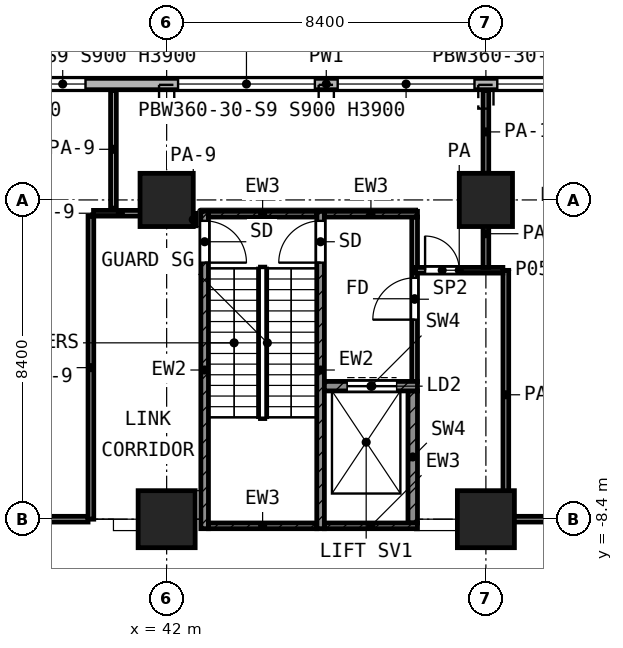
"""IFC4 building model, lengths in metres.
Left out: names, types, materials, properties, quantities, classifications, styles, units other than length and angle.
Written with IfcOpenShell. Run it as: python <this file> out.ifc"""

import sys

from ifc_helpers import new_model, si_unit, direction, frame, frame_2d, origin, origin_2d, place, context, subcontext, project, spatial, rectangle, extrude, element, fill, save


model = new_model("IFC4")
c1 = context("Model", 3, precision=1e-05, world=origin(), true_north=direction((0.0, 1.0)))
c2 = subcontext(c1, "Body", "Model", "MODEL_VIEW")
j1 = project(units=[si_unit("LENGTHUNIT", "METRE"), si_unit("PLANEANGLEUNIT", "RADIAN")], contexts=[c1])
p1 = place(None, origin())
s1 = spatial("IfcSite", under=j1, at=p1, CompositionType="ELEMENT")
p2 = place(p1, origin())
s2 = spatial("IfcBuilding", under=s1, at=p2, CompositionType="ELEMENT")
p3 = place(p2, frame((0.0, 0.0, 23.8)))
s3 = spatial("IfcBuildingStorey", under=s2, at=p3, CompositionType="ELEMENT", Elevation=23.8)
for number, where, z_axis, x_axis in (
    (1, (42.0, 0.0, 0.0), (0.0, 0.0, 1.0), (1.0, 0.0, 0.0)),
    (2, (50.4, 0.0, 0.0), (0.0, 0.0, 1.0), (1.0, 0.0, 0.0)),
):
    element("IfcColumn", number, at=place(p3, frame(where, z_axis=z_axis, x_axis=x_axis)), inside=s3, PredefinedType="COLUMN", context=c2, shape_type="SweptSolid", body=[
        extrude(rectangle(XDim=1.4, YDim=1.4, at=origin_2d()), origin(), (0.0, 0.0, 1.0), 5.2),
    ])
for number, where, z_axis, x_axis in (
    (3, (42.0, -8.4, 0.0), (0.0, 0.0, 1.0), (1.0, 0.0, 0.0)),
    (4, (50.4, -8.4, 0.0), (0.0, 0.0, 1.0), (1.0, 0.0, 0.0)),
):
    element("IfcColumn", number, at=place(p3, frame(where, z_axis=z_axis, x_axis=x_axis)), inside=s3, PredefinedType="COLUMN", context=c2, shape_type="SweptSolid", body=[
        extrude(rectangle(XDim=1.5, YDim=1.5, at=origin_2d()), origin(), (0.0, 0.0, 1.0), 5.2),
    ])
p4 = place(p3, frame((89.538, 3.05, 0.0), z_axis=(0.0, 0.0, 1.0), x_axis=(-1.0, 0.0, 0.0)))
e5 = element("IfcWall", 5, at=p4, inside=s3, PredefinedType="SOLIDWALL", context=c2, shape_type="SweptSolid", body=[
    extrude(rectangle(XDim=86.676, YDim=0.3, at=frame_2d((43.338, 0.0))), origin(), (0.0, 0.0, 1.0), 4.85),
])
p5 = place(p4, frame((1.638, 0.0, 0.9)))
e6 = element("IfcOpeningElement", 6, at=p5, cuts=e5, PredefinedType="OPENING", context=c2, shape_type="SweptSolid", body=[
    extrude(rectangle(XDim=3.6, YDim=3.0, at=frame_2d((1.8, 1.5))), frame((0.0, 0.16, 0.0), z_axis=(0.0, -1.0, 0.0), x_axis=(1.0, 0.0, 0.0)), (0.0, 0.0, 1.0), 0.32),
])
p6 = place(p4, frame((5.838, 0.0, 0.9)))
e7 = element("IfcOpeningElement", 7, at=p6, cuts=e5, PredefinedType="OPENING", context=c2, shape_type="SweptSolid", body=[
    extrude(rectangle(XDim=3.6, YDim=3.0, at=frame_2d((1.8, 1.5))), frame((0.0, 0.16, 0.0), z_axis=(0.0, -1.0, 0.0), x_axis=(1.0, 0.0, 0.0)), (0.0, 0.0, 1.0), 0.32),
])
p7 = place(p4, frame((10.723, 0.0, 0.9)))
e8 = element("IfcOpeningElement", 8, at=p7, cuts=e5, PredefinedType="OPENING", context=c2, shape_type="SweptSolid", body=[
    extrude(rectangle(XDim=2.4, YDim=3.0, at=frame_2d((1.2, 1.5))), frame((0.0, 0.16, 0.0), z_axis=(0.0, -1.0, 0.0), x_axis=(1.0, 0.0, 0.0)), (0.0, 0.0, 1.0), 0.32),
])
p8 = place(p4, frame((14.623, 0.0, 0.9)))
e9 = element("IfcOpeningElement", 9, at=p8, cuts=e5, PredefinedType="OPENING", context=c2, shape_type="SweptSolid", body=[
    extrude(rectangle(XDim=2.4, YDim=3.0, at=frame_2d((1.2, 1.5))), frame((0.0, 0.16, 0.0), z_axis=(0.0, -1.0, 0.0), x_axis=(1.0, 0.0, 0.0)), (0.0, 0.0, 1.0), 0.32),
])
p9 = place(p4, frame((18.438, 0.0, 0.9)))
e10 = element("IfcOpeningElement", 10, at=p9, cuts=e5, PredefinedType="OPENING", context=c2, shape_type="SweptSolid", body=[
    extrude(rectangle(XDim=3.6, YDim=3.0, at=frame_2d((1.8, 1.5))), frame((0.0, 0.16, 0.0), z_axis=(0.0, -1.0, 0.0), x_axis=(1.0, 0.0, 0.0)), (0.0, 0.0, 1.0), 0.32),
])
p10 = place(p4, frame((22.638, 0.0, 0.9)))
e11 = element("IfcOpeningElement", 11, at=p10, cuts=e5, PredefinedType="OPENING", context=c2, shape_type="SweptSolid", body=[
    extrude(rectangle(XDim=3.6, YDim=3.0, at=frame_2d((1.8, 1.5))), frame((0.0, 0.16, 0.0), z_axis=(0.0, -1.0, 0.0), x_axis=(1.0, 0.0, 0.0)), (0.0, 0.0, 1.0), 0.32),
])
p11 = place(p4, frame((26.838, 0.0, 0.9)))
e12 = element("IfcOpeningElement", 12, at=p11, cuts=e5, PredefinedType="OPENING", context=c2, shape_type="SweptSolid", body=[
    extrude(rectangle(XDim=3.6, YDim=3.0, at=frame_2d((1.8, 1.5))), frame((0.0, 0.16, 0.0), z_axis=(0.0, -1.0, 0.0), x_axis=(1.0, 0.0, 0.0)), (0.0, 0.0, 1.0), 0.32),
])
p12 = place(p4, frame((31.038, 0.0, 0.9)))
e13 = element("IfcOpeningElement", 13, at=p12, cuts=e5, PredefinedType="OPENING", context=c2, shape_type="SweptSolid", body=[
    extrude(rectangle(XDim=3.6, YDim=3.0, at=frame_2d((1.8, 1.5))), frame((0.0, 0.16, 0.0), z_axis=(0.0, -1.0, 0.0), x_axis=(1.0, 0.0, 0.0)), (0.0, 0.0, 1.0), 0.32),
])
p13 = place(p4, frame((35.238, 0.0, 0.9)))
e14 = element("IfcOpeningElement", 14, at=p13, cuts=e5, PredefinedType="OPENING", context=c2, shape_type="SweptSolid", body=[
    extrude(rectangle(XDim=3.6, YDim=3.0, at=frame_2d((1.8, 1.5))), frame((0.0, 0.16, 0.0), z_axis=(0.0, -1.0, 0.0), x_axis=(1.0, 0.0, 0.0)), (0.0, 0.0, 1.0), 0.32),
])
p14 = place(p4, frame((39.438, 0.0, 0.9)))
e15 = element("IfcOpeningElement", 15, at=p14, cuts=e5, PredefinedType="OPENING", context=c2, shape_type="SweptSolid", body=[
    extrude(rectangle(XDim=3.6, YDim=3.0, at=frame_2d((1.8, 1.5))), frame((0.0, 0.16, 0.0), z_axis=(0.0, -1.0, 0.0), x_axis=(1.0, 0.0, 0.0)), (0.0, 0.0, 1.0), 0.32),
])
p15 = place(p4, frame((43.638, 0.0, 0.9)))
e16 = element("IfcOpeningElement", 16, at=p15, cuts=e5, PredefinedType="OPENING", context=c2, shape_type="SweptSolid", body=[
    extrude(rectangle(XDim=3.6, YDim=3.0, at=frame_2d((1.8, 1.5))), frame((0.0, 0.16, 0.0), z_axis=(0.0, -1.0, 0.0), x_axis=(1.0, 0.0, 0.0)), (0.0, 0.0, 1.0), 0.32),
])
p16 = place(p4, frame((49.673, 0.0, 0.9)))
e17 = element("IfcOpeningElement", 17, at=p16, cuts=e5, PredefinedType="OPENING", context=c2, shape_type="SweptSolid", body=[
    extrude(rectangle(XDim=1.2, YDim=3.0, at=frame_2d((0.6, 1.5))), frame((0.0, 0.16, 0.0), z_axis=(0.0, -1.0, 0.0), x_axis=(1.0, 0.0, 0.0)), (0.0, 0.0, 1.0), 0.32),
])
p17 = place(p4, frame((52.038, 0.0, 0.9)))
e18 = element("IfcOpeningElement", 18, at=p17, cuts=e5, PredefinedType="OPENING", context=c2, shape_type="SweptSolid", body=[
    extrude(rectangle(XDim=3.6, YDim=3.0, at=frame_2d((1.8, 1.5))), frame((0.0, 0.16, 0.0), z_axis=(0.0, -1.0, 0.0), x_axis=(1.0, 0.0, 0.0)), (0.0, 0.0, 1.0), 0.32),
])
p18 = place(p4, frame((56.623, 0.0, 0.9)))
e19 = element("IfcOpeningElement", 19, at=p18, cuts=e5, PredefinedType="OPENING", context=c2, shape_type="SweptSolid", body=[
    extrude(rectangle(XDim=2.4, YDim=3.0, at=frame_2d((1.2, 1.5))), frame((0.0, 0.16, 0.0), z_axis=(0.0, -1.0, 0.0), x_axis=(1.0, 0.0, 0.0)), (0.0, 0.0, 1.0), 0.32),
])
p19 = place(p4, frame((60.438, 0.0, 0.9)))
e20 = element("IfcOpeningElement", 20, at=p19, cuts=e5, PredefinedType="OPENING", context=c2, shape_type="SweptSolid", body=[
    extrude(rectangle(XDim=3.6, YDim=3.0, at=frame_2d((1.8, 1.5))), frame((0.0, 0.16, 0.0), z_axis=(0.0, -1.0, 0.0), x_axis=(1.0, 0.0, 0.0)), (0.0, 0.0, 1.0), 0.32),
])
p20 = place(p4, frame((64.638, 0.0, 0.9)))
e21 = element("IfcOpeningElement", 21, at=p20, cuts=e5, PredefinedType="OPENING", context=c2, shape_type="SweptSolid", body=[
    extrude(rectangle(XDim=3.6, YDim=3.0, at=frame_2d((1.8, 1.5))), frame((0.0, 0.16, 0.0), z_axis=(0.0, -1.0, 0.0), x_axis=(1.0, 0.0, 0.0)), (0.0, 0.0, 1.0), 0.32),
])
p21 = place(p4, frame((68.838, 0.0, 0.9)))
e22 = element("IfcOpeningElement", 22, at=p21, cuts=e5, PredefinedType="OPENING", context=c2, shape_type="SweptSolid", body=[
    extrude(rectangle(XDim=3.6, YDim=3.0, at=frame_2d((1.8, 1.5))), frame((0.0, 0.16, 0.0), z_axis=(0.0, -1.0, 0.0), x_axis=(1.0, 0.0, 0.0)), (0.0, 0.0, 1.0), 0.32),
])
p22 = place(p4, frame((73.038, 0.0, 0.9)))
e23 = element("IfcOpeningElement", 23, at=p22, cuts=e5, PredefinedType="OPENING", context=c2, shape_type="SweptSolid", body=[
    extrude(rectangle(XDim=3.6, YDim=3.0, at=frame_2d((1.8, 1.5))), frame((0.0, 0.16, 0.0), z_axis=(0.0, -1.0, 0.0), x_axis=(1.0, 0.0, 0.0)), (0.0, 0.0, 1.0), 0.32),
])
p23 = place(p4, frame((77.238, 0.0, 0.9)))
e24 = element("IfcOpeningElement", 24, at=p23, cuts=e5, PredefinedType="OPENING", context=c2, shape_type="SweptSolid", body=[
    extrude(rectangle(XDim=3.6, YDim=3.0, at=frame_2d((1.8, 1.5))), frame((0.0, 0.16, 0.0), z_axis=(0.0, -1.0, 0.0), x_axis=(1.0, 0.0, 0.0)), (0.0, 0.0, 1.0), 0.32),
])
p24 = place(p4, frame((81.438, 0.0, 0.9)))
e25 = element("IfcOpeningElement", 25, at=p24, cuts=e5, PredefinedType="OPENING", context=c2, shape_type="SweptSolid", body=[
    extrude(rectangle(XDim=3.6, YDim=3.0, at=frame_2d((1.8, 1.5))), frame((0.0, 0.16, 0.0), z_axis=(0.0, -1.0, 0.0), x_axis=(1.0, 0.0, 0.0)), (0.0, 0.0, 1.0), 0.32),
])
p25 = place(p3, frame((43.0, -8.65, 0.0), z_axis=(0.0, 0.0, 1.0), x_axis=(0.0, 1.0, 0.0)))
e26 = element("IfcWall", 26, at=p25, inside=s3, PredefinedType="SHEAR", context=c2, shape_type="SweptSolid", body=[
    extrude(rectangle(XDim=8.35, YDim=0.2, at=frame_2d((4.175, 0.0))), origin(), (0.0, 0.0, 1.0), 4.85),
])
p26 = place(p25, frame((7.0, 0.0, 0.0)))
e27 = element("IfcOpeningElement", 27, at=p26, cuts=e26, PredefinedType="OPENING", context=c2, shape_type="SweptSolid", body=[
    extrude(rectangle(XDim=1.1, YDim=2.1, at=frame_2d((0.55, 1.05))), frame((0.0, 0.11, 0.0), z_axis=(0.0, -1.0, 0.0), x_axis=(1.0, 0.0, 0.0)), (0.0, 0.0, 1.0), 0.22),
])
p27 = place(p3, frame((46.05, -8.65, 0.0), z_axis=(0.0, 0.0, 1.0), x_axis=(0.0, 1.0, 0.0)))
e28 = element("IfcWall", 28, at=p27, inside=s3, PredefinedType="SHEAR", context=c2, shape_type="SweptSolid", body=[
    extrude(rectangle(XDim=8.35, YDim=0.2, at=frame_2d((4.175, 0.0))), origin(), (0.0, 0.0, 1.0), 4.85),
])
p28 = place(p27, frame((7.0, 0.0, 0.0)))
e29 = element("IfcOpeningElement", 29, at=p28, cuts=e28, PredefinedType="OPENING", context=c2, shape_type="SweptSolid", body=[
    extrude(rectangle(XDim=1.1, YDim=2.1, at=frame_2d((0.55, 1.05))), frame((0.0, 0.11, 0.0), z_axis=(0.0, -1.0, 0.0), x_axis=(1.0, 0.0, 0.0)), (0.0, 0.0, 1.0), 0.22),
])
p29 = place(p3, frame((43.1, -0.375, 0.0), z_axis=(0.0, 0.0, 1.0), x_axis=(1.0, 0.0, 0.0)))
e30 = element("IfcWall", 30, at=p29, inside=s3, PredefinedType="SHEAR", context=c2, shape_type="SweptSolid", body=[
    extrude(rectangle(XDim=2.85, YDim=0.15, at=frame_2d((1.425, 0.0))), origin(), (0.0, 0.0, 1.0), 4.85),
])
p30 = place(p3, frame((46.15, -0.375, 0.0), z_axis=(0.0, 0.0, 1.0), x_axis=(1.0, 0.0, 0.0)))
e31 = element("IfcWall", 31, at=p30, inside=s3, PredefinedType="SHEAR", context=c2, shape_type="SweptSolid", body=[
    extrude(rectangle(XDim=2.45, YDim=0.15, at=frame_2d((1.225, 0.0))), origin(), (0.0, 0.0, 1.0), 4.85),
])
p31 = place(p3, frame((43.1, -8.575, 0.0), z_axis=(0.0, 0.0, 1.0), x_axis=(1.0, 0.0, 0.0)))
e32 = element("IfcWall", 32, at=p31, inside=s3, PredefinedType="SHEAR", context=c2, shape_type="SweptSolid", body=[
    extrude(rectangle(XDim=2.85, YDim=0.15, at=frame_2d((1.425, 0.0))), origin(), (0.0, 0.0, 1.0), 4.85),
])
p32 = place(p3, frame((46.15, -8.575, 0.0), z_axis=(0.0, 0.0, 1.0), x_axis=(1.0, 0.0, 0.0)))
e33 = element("IfcWall", 33, at=p32, inside=s3, PredefinedType="SHEAR", context=c2, shape_type="SweptSolid", body=[
    extrude(rectangle(XDim=2.45, YDim=0.15, at=frame_2d((1.225, 0.0))), origin(), (0.0, 0.0, 1.0), 4.85),
])
p33 = place(p3, frame((46.15, -4.9, 0.0), z_axis=(0.0, 0.0, 1.0), x_axis=(1.0, 0.0, 0.0)))
e34 = element("IfcWall", 34, at=p33, inside=s3, PredefinedType="SHEAR", context=c2, shape_type="SweptSolid", body=[
    extrude(rectangle(XDim=2.45, YDim=0.25, at=frame_2d((1.225, 0.0))), origin(), (0.0, 0.0, 1.0), 4.85),
])
p34 = place(p33, frame((0.6, 0.0, 0.0)))
e35 = element("IfcOpeningElement", 35, at=p34, cuts=e34, PredefinedType="OPENING", context=c2, shape_type="SweptSolid", body=[
    extrude(rectangle(XDim=1.3, YDim=2.1, at=frame_2d((0.65, 1.05))), frame((0.0, 0.135, 0.0), z_axis=(0.0, -1.0, 0.0), x_axis=(1.0, 0.0, 0.0)), (0.0, 0.0, 1.0), 0.27),
])
p35 = place(p3, frame((48.475, -8.5, 0.0), z_axis=(0.0, 0.0, 1.0), x_axis=(0.0, 1.0, 0.0)))
e36 = element("IfcWall", 36, at=p35, inside=s3, PredefinedType="SHEAR", context=c2, shape_type="SweptSolid", body=[
    extrude(rectangle(XDim=3.475, YDim=0.25, at=frame_2d((1.738, 0.0))), origin(), (0.0, 0.0, 1.0), 4.85),
])
p36 = place(p3, frame((48.525, -4.775, 0.0), z_axis=(0.0, 0.0, 1.0), x_axis=(0.0, 1.0, 0.0)))
e37 = element("IfcWall", 37, at=p36, inside=s3, PredefinedType="PARTITIONING", context=c2, shape_type="SweptSolid", body=[
    extrude(rectangle(XDim=4.325, YDim=0.15, at=frame_2d((2.163, 0.0))), origin(), (0.0, 0.0, 1.0), 4.85),
])
p37 = place(p36, frame((1.625, 0.0, 0.0)))
e38 = element("IfcOpeningElement", 38, at=p37, cuts=e37, PredefinedType="OPENING", context=c2, shape_type="SweptSolid", body=[
    extrude(rectangle(XDim=1.1, YDim=2.1, at=frame_2d((0.55, 1.05))), frame((0.0, 0.085, 0.0), z_axis=(0.0, -1.0, 0.0), x_axis=(1.0, 0.0, 0.0)), (0.0, 0.0, 1.0), 0.17),
])
p38 = place(p3, frame((25.2, -8.4, 0.0), z_axis=(0.0, 0.0, 1.0), x_axis=(1.0, 0.0, 0.0)))
e39 = element("IfcWall", 39, at=p38, inside=s3, PredefinedType="PARTITIONING", context=c2, shape_type="SweptSolid", body=[
    extrude(rectangle(XDim=14.732, YDim=0.15, at=frame_2d((7.366, 0.0))), origin(), (0.0, 0.0, 1.0), 4.85),
])
p39 = place(p38, frame((1.8, 0.0, 0.0)))
e40 = element("IfcOpeningElement", 40, at=p39, cuts=e39, PredefinedType="OPENING", context=c2, shape_type="SweptSolid", body=[
    extrude(rectangle(XDim=1.2, YDim=2.1, at=frame_2d((0.6, 1.05))), frame((0.0, 0.085, 0.0), z_axis=(0.0, -1.0, 0.0), x_axis=(1.0, 0.0, 0.0)), (0.0, 0.0, 1.0), 0.17),
])
p40 = place(p38, frame((6.536, 0.0, 0.0)))
e41 = element("IfcOpeningElement", 41, at=p40, cuts=e39, PredefinedType="OPENING", context=c2, shape_type="SweptSolid", body=[
    extrude(rectangle(XDim=1.0, YDim=2.1, at=frame_2d((0.5, 1.05))), frame((0.0, 0.085, 0.0), z_axis=(0.0, -1.0, 0.0), x_axis=(1.0, 0.0, 0.0)), (0.0, 0.0, 1.0), 0.17),
])
p41 = place(p38, frame((10.971, 0.0, 0.0)))
e42 = element("IfcOpeningElement", 42, at=p41, cuts=e39, PredefinedType="OPENING", context=c2, shape_type="SweptSolid", body=[
    extrude(rectangle(XDim=1.0, YDim=2.1, at=frame_2d((0.5, 1.05))), frame((0.0, 0.085, 0.0), z_axis=(0.0, -1.0, 0.0), x_axis=(1.0, 0.0, 0.0)), (0.0, 0.0, 1.0), 0.17),
])
p42 = place(p3, frame((51.0, -8.4, 0.0), z_axis=(0.0, 0.0, 1.0), x_axis=(1.0, 0.0, 0.0)))
e43 = element("IfcWall", 43, at=p42, inside=s3, PredefinedType="PARTITIONING", context=c2, shape_type="SweptSolid", body=[
    extrude(rectangle(XDim=26.2, YDim=0.15, at=frame_2d((13.1, 0.0))), origin(), (0.0, 0.0, 1.0), 4.85),
])
p43 = place(p42, frame((2.05, 0.0, 0.0)))
e44 = element("IfcOpeningElement", 44, at=p43, cuts=e43, PredefinedType="OPENING", context=c2, shape_type="SweptSolid", body=[
    extrude(rectangle(XDim=1.0, YDim=2.1, at=frame_2d((0.5, 1.05))), frame((0.0, 0.085, 0.0), z_axis=(0.0, -1.0, 0.0), x_axis=(1.0, 0.0, 0.0)), (0.0, 0.0, 1.0), 0.17),
])
p44 = place(p42, frame((4.675, 0.0, 0.0)))
e45 = element("IfcOpeningElement", 45, at=p44, cuts=e43, PredefinedType="OPENING", context=c2, shape_type="SweptSolid", body=[
    extrude(rectangle(XDim=1.0, YDim=2.1, at=frame_2d((0.5, 1.05))), frame((0.0, 0.085, 0.0), z_axis=(0.0, -1.0, 0.0), x_axis=(1.0, 0.0, 0.0)), (0.0, 0.0, 1.0), 0.17),
])
p45 = place(p42, frame((11.7, 0.0, 0.0)))
e46 = element("IfcOpeningElement", 46, at=p45, cuts=e43, PredefinedType="OPENING", context=c2, shape_type="SweptSolid", body=[
    extrude(rectangle(XDim=1.0, YDim=2.1, at=frame_2d((0.5, 1.05))), frame((0.0, 0.085, 0.0), z_axis=(0.0, -1.0, 0.0), x_axis=(1.0, 0.0, 0.0)), (0.0, 0.0, 1.0), 0.17),
])
p46 = place(p42, frame((17.0, 0.0, 0.0)))
e47 = element("IfcOpeningElement", 47, at=p46, cuts=e43, PredefinedType="OPENING", context=c2, shape_type="SweptSolid", body=[
    extrude(rectangle(XDim=1.0, YDim=2.1, at=frame_2d((0.5, 1.05))), frame((0.0, 0.085, 0.0), z_axis=(0.0, -1.0, 0.0), x_axis=(1.0, 0.0, 0.0)), (0.0, 0.0, 1.0), 0.17),
])
p47 = place(p42, frame((22.233, 0.0, 0.0)))
e48 = element("IfcOpeningElement", 48, at=p47, cuts=e43, PredefinedType="OPENING", context=c2, shape_type="SweptSolid", body=[
    extrude(rectangle(XDim=1.0, YDim=2.1, at=frame_2d((0.5, 1.05))), frame((0.0, 0.085, 0.0), z_axis=(0.0, -1.0, 0.0), x_axis=(1.0, 0.0, 0.0)), (0.0, 0.0, 1.0), 0.17),
])
p48 = place(p3, frame((48.55, -1.85, 0.0), z_axis=(0.0, 0.0, 1.0), x_axis=(1.0, 0.0, 0.0)))
e49 = element("IfcWall", 49, at=p48, inside=s3, PredefinedType="PARTITIONING", context=c2, shape_type="SweptSolid", body=[
    extrude(rectangle(XDim=2.297, YDim=0.15, at=frame_2d((1.148, 0.0))), origin(), (0.0, 0.0, 1.0), 4.85),
])
p49 = place(p48, frame((0.25, 0.0, 0.0)))
e50 = element("IfcOpeningElement", 50, at=p49, cuts=e49, PredefinedType="OPENING", context=c2, shape_type="SweptSolid", body=[
    extrude(rectangle(XDim=0.9, YDim=2.1, at=frame_2d((0.45, 1.05))), frame((0.0, 0.085, 0.0), z_axis=(0.0, -1.0, 0.0), x_axis=(1.0, 0.0, 0.0)), (0.0, 0.0, 1.0), 0.17),
])
p50 = place(p3, frame((40.076, -0.35, 0.0), z_axis=(0.0, 0.0, 1.0), x_axis=(1.0, 0.0, 0.0)))
e51 = element("IfcWall", 51, at=p50, inside=s3, PredefinedType="PARTITIONING", context=c2, shape_type="SweptSolid", body=[
    extrude(rectangle(XDim=1.412, YDim=0.15, at=frame_2d((0.706, 0.0))), origin(), (0.0, 0.0, 1.0), 3.45),
])
p51 = place(p3, frame((40.007, -8.4, 0.0), z_axis=(0.0, 0.0, 1.0), x_axis=(0.0, 1.0, 0.0)))
e52 = element("IfcWall", 52, at=p51, inside=s3, PredefinedType="PARTITIONING", context=c2, shape_type="SweptSolid", body=[
    extrude(rectangle(XDim=7.975, YDim=0.15, at=frame_2d((3.987, 0.0))), origin(), (0.0, 0.0, 1.0), 3.45),
])
p52 = place(p3, frame((40.6, -0.215, 0.0), z_axis=(0.0, 0.0, 1.0), x_axis=(0.0, 1.0, 0.0)))
e53 = element("IfcWall", 53, at=p52, inside=s3, PredefinedType="PARTITIONING", context=c2, shape_type="SweptSolid", body=[
    extrude(rectangle(XDim=3.095, YDim=0.15, at=frame_2d((1.547, 0.0))), origin(), (0.0, 0.0, 1.0), 3.45),
])
p53 = place(p3, frame((42.7, -0.68, 0.0), z_axis=(0.0, 0.0, 1.0), x_axis=(0.0, 1.0, 0.0)))
e54 = element("IfcWall", 54, at=p53, inside=s3, PredefinedType="PARTITIONING", context=c2, shape_type="SweptSolid", body=[
    extrude(rectangle(XDim=0.327, YDim=0.15, at=frame_2d((0.164, 0.0))), origin(), (0.0, 0.0, 1.0), 3.45),
])
p54 = place(p3, frame((50.4, -1.775, 0.0), z_axis=(0.0, 0.0, 1.0), x_axis=(0.0, 1.0, 0.0)))
e55 = element("IfcWall", 55, at=p54, inside=s3, PredefinedType="PARTITIONING", context=c2, shape_type="SweptSolid", body=[
    extrude(rectangle(XDim=1.772, YDim=0.15, at=frame_2d((0.886, 0.0))), origin(), (0.0, 0.0, 1.0), 4.85),
])
p55 = place(p3, frame((50.4, 0.7, 0.0), z_axis=(0.0, 0.0, 1.0), x_axis=(0.0, 1.0, 0.0)))
e56 = element("IfcWall", 56, at=p55, inside=s3, PredefinedType="PARTITIONING", context=c2, shape_type="SweptSolid", body=[
    extrude(rectangle(XDim=2.18, YDim=0.15, at=frame_2d((1.09, 0.0))), origin(), (0.0, 0.0, 1.0), 3.95),
])
p56 = place(p3, frame((50.925, -8.4, 0.0), z_axis=(0.0, 0.0, 1.0), x_axis=(0.0, 1.0, 0.0)))
e57 = element("IfcWall", 57, at=p56, inside=s3, PredefinedType="PARTITIONING", context=c2, shape_type="SweptSolid", body=[
    extrude(rectangle(XDim=6.547, YDim=0.15, at=frame_2d((3.273, 0.0))), origin(), (0.0, 0.0, 1.0), 4.85),
])
p57 = place(p13, origin())
e58 = element("IfcWindow", 58, at=p57, inside=s3, PartitioningType="SINGLE_PANEL", PredefinedType="WINDOW", context=c2, shape_type="SweptSolid", body=[
    extrude(rectangle(XDim=3.6, YDim=3.0, at=frame_2d((1.8, 1.5))), frame((0.0, 0.03, 0.0), z_axis=(0.0, -1.0, 0.0), x_axis=(1.0, 0.0, 0.0)), (0.0, 0.0, 1.0), 0.06),
])
fill(e14, e58)
p58 = place(p14, origin())
e59 = element("IfcWindow", 59, at=p58, inside=s3, PartitioningType="SINGLE_PANEL", PredefinedType="WINDOW", context=c2, shape_type="SweptSolid", body=[
    extrude(rectangle(XDim=3.6, YDim=3.0, at=frame_2d((1.8, 1.5))), frame((0.0, 0.03, 0.0), z_axis=(0.0, -1.0, 0.0), x_axis=(1.0, 0.0, 0.0)), (0.0, 0.0, 1.0), 0.06),
])
fill(e15, e59)
p59 = place(p15, origin())
e60 = element("IfcWindow", 60, at=p59, inside=s3, PartitioningType="SINGLE_PANEL", PredefinedType="WINDOW", context=c2, shape_type="SweptSolid", body=[
    extrude(rectangle(XDim=3.6, YDim=3.0, at=frame_2d((1.8, 1.5))), frame((0.0, 0.03, 0.0), z_axis=(0.0, -1.0, 0.0), x_axis=(1.0, 0.0, 0.0)), (0.0, 0.0, 1.0), 0.06),
])
fill(e16, e60)
p60 = place(p16, origin())
e61 = element("IfcWindow", 61, at=p60, inside=s3, PartitioningType="SINGLE_PANEL", PredefinedType="WINDOW", context=c2, shape_type="SweptSolid", body=[
    extrude(rectangle(XDim=1.2, YDim=3.0, at=frame_2d((0.6, 1.5))), frame((0.0, 0.03, 0.0), z_axis=(0.0, -1.0, 0.0), x_axis=(1.0, 0.0, 0.0)), (0.0, 0.0, 1.0), 0.06),
])
fill(e17, e61)
p61 = place(p26, frame((1.1, 0.0, 0.0), z_axis=(0.0, 0.0, 1.0), x_axis=(-1.0, 0.0, 0.0)))
e62 = element("IfcDoor", 62, at=p61, inside=s3, OperationType="SINGLE_SWING_LEFT", PredefinedType="DOOR", context=c2, shape_type="SweptSolid", body=[
    extrude(rectangle(XDim=1.1, YDim=2.1, at=frame_2d((0.55, 1.05))), frame((0.0, 0.025, 0.0), z_axis=(0.0, -1.0, 0.0), x_axis=(1.0, 0.0, 0.0)), (0.0, 0.0, 1.0), 0.05),
])
fill(e27, e62)
p62 = place(p28, origin())
e63 = element("IfcDoor", 63, at=p62, inside=s3, OperationType="SINGLE_SWING_LEFT", PredefinedType="DOOR", context=c2, shape_type="SweptSolid", body=[
    extrude(rectangle(XDim=1.1, YDim=2.1, at=frame_2d((0.55, 1.05))), frame((0.0, 0.025, 0.0), z_axis=(0.0, -1.0, 0.0), x_axis=(1.0, 0.0, 0.0)), (0.0, 0.0, 1.0), 0.05),
])
fill(e29, e63)
p63 = place(p34, origin())
e64 = element("IfcDoor", 64, at=p63, inside=s3, OperationType="DOUBLE_DOOR_SLIDING", PredefinedType="DOOR", context=c2, shape_type="SweptSolid", body=[
    extrude(rectangle(XDim=1.3, YDim=2.1, at=frame_2d((0.65, 1.05))), frame((0.0, 0.025, 0.0), z_axis=(0.0, -1.0, 0.0), x_axis=(1.0, 0.0, 0.0)), (0.0, 0.0, 1.0), 0.05),
])
fill(e35, e64)
p64 = place(p37, origin())
e65 = element("IfcDoor", 65, at=p64, inside=s3, OperationType="SINGLE_SWING_LEFT", PredefinedType="DOOR", context=c2, shape_type="SweptSolid", body=[
    extrude(rectangle(XDim=1.1, YDim=2.1, at=frame_2d((0.55, 1.05))), frame((0.0, 0.025, 0.0), z_axis=(0.0, -1.0, 0.0), x_axis=(1.0, 0.0, 0.0)), (0.0, 0.0, 1.0), 0.05),
])
fill(e38, e65)
p65 = place(p49, origin())
e66 = element("IfcDoor", 66, at=p65, inside=s3, OperationType="SINGLE_SWING_LEFT", PredefinedType="DOOR", context=c2, shape_type="SweptSolid", body=[
    extrude(rectangle(XDim=0.9, YDim=2.1, at=frame_2d((0.45, 1.05))), frame((0.0, 0.025, 0.0), z_axis=(0.0, -1.0, 0.0), x_axis=(1.0, 0.0, 0.0)), (0.0, 0.0, 1.0), 0.05),
])
fill(e50, e66)
save(model, sys.argv[1])
